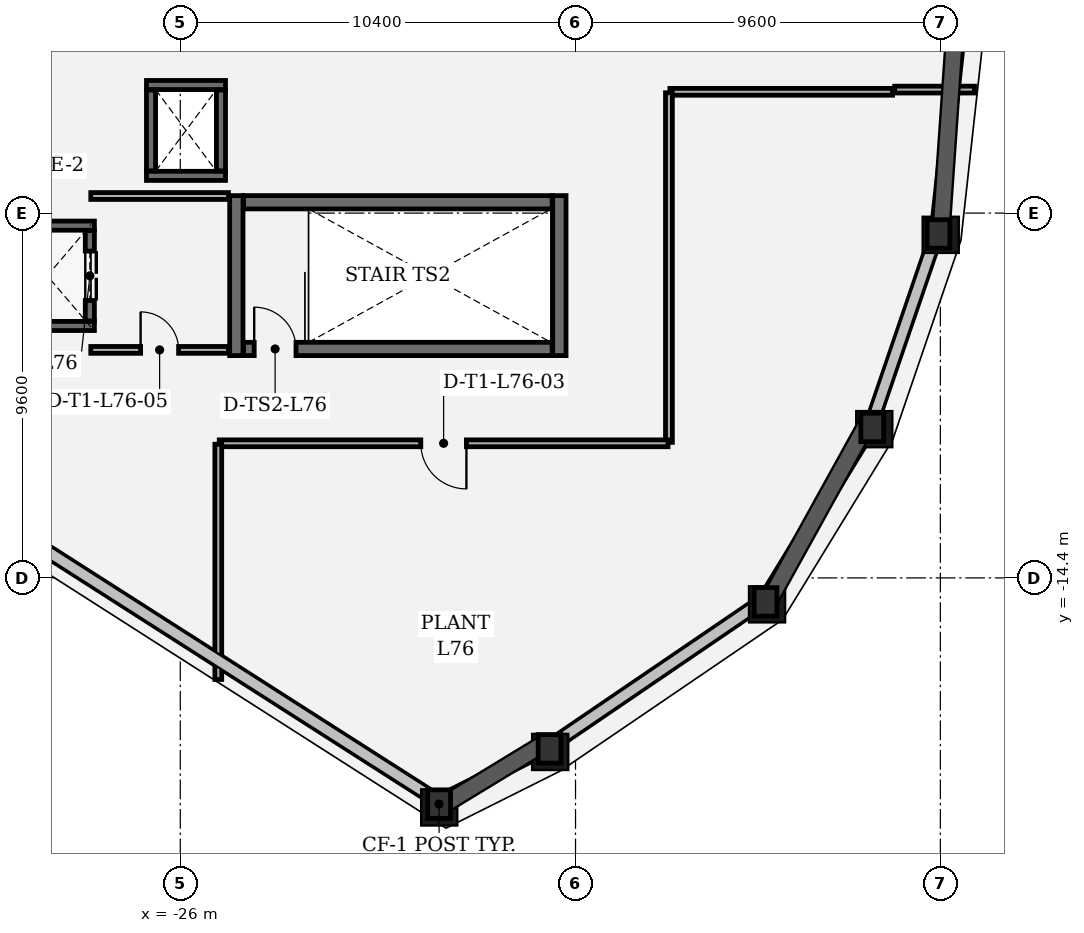
"""IFC4 building model, lengths in metres.
Left out: names, types, materials, properties, quantities, classifications, styles, units other than length and angle.
Written with IfcOpenShell. Run it as: python <this file> out.ifc"""

import sys

from ifc_helpers import new_model, si_unit, direction, frame, frame_2d, origin, place, context, subcontext, project, spatial, rectangle, extrude, element, fill, save


model = new_model("IFC4")
c1 = context("Model", 3, precision=1e-05, world=origin(), true_north=direction((0.0, 1.0)))
c2 = subcontext(c1, "Body", "Model", "MODEL_VIEW")
j1 = project(units=[si_unit("LENGTHUNIT", "METRE"), si_unit("PLANEANGLEUNIT", "RADIAN")], contexts=[c1])
p1 = place(None, origin())
s1 = spatial("IfcSite", under=j1, at=p1, CompositionType="ELEMENT")
p2 = place(p1, origin())
s2 = spatial("IfcBuilding", under=s1, at=p2, CompositionType="ELEMENT")
p3 = place(p2, frame((0.0, 0.0, 327.0)))
s3 = spatial("IfcBuildingStorey", under=s2, at=p3, CompositionType="ELEMENT", Elevation=327.0)
for number, where, z_axis, x_axis in (
    (1, (-24.525, -4.34, 0.0), (0.0, 0.0, 1.0), (0.0, -1.0, 0.0)),
    (2, (-16.025, -8.55, 0.0), (0.0, 0.0, 1.0), (0.0, 1.0, 0.0)),
):
    element("IfcWall", number, at=place(p3, frame(where, z_axis=z_axis, x_axis=x_axis)), inside=s3, PredefinedType="SHEAR", context=c2, shape_type="SweptSolid", body=[
        extrude(rectangle(XDim=4.21, YDim=0.35, at=frame_2d((2.105, 0.0))), origin(), (0.0, 0.0, 1.0), 3.92),
    ])
p4 = place(p3, frame((-24.335, -8.375, 0.0), z_axis=(0.0, 0.0, 1.0), x_axis=(1.0, 0.0, 0.0)))
e3 = element("IfcWall", 3, at=p4, inside=s3, PredefinedType="SHEAR", context=c2, shape_type="SweptSolid", body=[
    extrude(rectangle(XDim=8.12, YDim=0.35, at=frame_2d((4.06, 0.0))), origin(), (0.0, 0.0, 1.0), 3.92),
])
p5 = place(p4, frame((0.28, 0.0, 0.0)))
e4 = element("IfcOpeningElement", 4, at=p5, cuts=e3, PredefinedType="OPENING", context=c2, shape_type="SweptSolid", body=[
    extrude(rectangle(XDim=1.1, YDim=2.2, at=frame_2d((0.55, 1.1))), frame((0.0, 0.185, 0.0), z_axis=(0.0, -1.0, 0.0), x_axis=(1.0, 0.0, 0.0)), (0.0, 0.0, 1.0), 0.37),
])
p6 = place(p3, frame((-16.215, -4.515, 0.0), z_axis=(0.0, 0.0, 1.0), x_axis=(-1.0, 0.0, 0.0)))
e5 = element("IfcWall", 5, at=p6, inside=s3, PredefinedType="SHEAR", context=c2, shape_type="SweptSolid", body=[
    extrude(rectangle(XDim=8.12, YDim=0.35, at=frame_2d((4.06, 0.0))), origin(), (0.0, 0.0, 1.0), 3.92),
])
for number, where, z_axis, x_axis in (
    (6, (-28.26, -7.77, 0.0), (0.0, 0.0, 1.0), (-1.0, 0.0, 0.0)),
    (7, (-30.74, -5.13, 0.0), (0.0, 0.0, 1.0), (1.0, 0.0, 0.0)),
):
    element("IfcWall", number, at=place(p3, frame(where, z_axis=z_axis, x_axis=x_axis)), inside=s3, PredefinedType="SHEAR", context=c2, shape_type="SweptSolid", body=[
        extrude(rectangle(XDim=2.48, YDim=0.24, at=frame_2d((1.24, 0.0))), origin(), (0.0, 0.0, 1.0), 3.92),
    ])
p7 = place(p3, frame((-28.38, -5.262, 0.0), z_axis=(0.0, 0.0, 1.0), x_axis=(0.0, -1.0, 0.0)))
e8 = element("IfcWall", 8, at=p7, inside=s3, PredefinedType="SHEAR", context=c2, shape_type="SweptSolid", body=[
    extrude(rectangle(XDim=2.376, YDim=0.24, at=frame_2d((1.188, 0.0))), origin(), (0.0, 0.0, 1.0), 3.92),
])
p8 = place(p7, frame((0.538, 0.0, 0.0)))
e9 = element("IfcOpeningElement", 9, at=p8, cuts=e8, PredefinedType="OPENING", context=c2, shape_type="SweptSolid", body=[
    extrude(rectangle(XDim=1.3, YDim=2.3, at=frame_2d((0.65, 1.15))), frame((0.0, 0.13, 0.0), z_axis=(0.0, -1.0, 0.0), x_axis=(1.0, 0.0, 0.0)), (0.0, 0.0, 1.0), 0.26),
])
for number, where, z_axis, x_axis in (
    (10, (-24.81, -3.82, 0.0), (0.0, 0.0, 1.0), (-1.0, 0.0, 0.0)),
    (11, (-26.89, -1.43, 0.0), (0.0, 0.0, 1.0), (1.0, 0.0, 0.0)),
):
    element("IfcWall", number, at=place(p3, frame(where, z_axis=z_axis, x_axis=x_axis)), inside=s3, PredefinedType="SHEAR", context=c2, shape_type="SweptSolid", body=[
        extrude(rectangle(XDim=2.08, YDim=0.24, at=frame_2d((1.04, 0.0))), origin(), (0.0, 0.0, 1.0), 3.92),
    ])
for number, where, z_axis, x_axis in (
    (12, (-26.77, -3.688, 0.0), (0.0, 0.0, 1.0), (0.0, 1.0, 0.0)),
    (13, (-24.93, -1.562, 0.0), (0.0, 0.0, 1.0), (0.0, -1.0, 0.0)),
):
    element("IfcWall", number, at=place(p3, frame(where, z_axis=z_axis, x_axis=x_axis)), inside=s3, PredefinedType="SHEAR", context=c2, shape_type="SweptSolid", body=[
        extrude(rectangle(XDim=2.126, YDim=0.24, at=frame_2d((1.063, 0.0))), origin(), (0.0, 0.0, 1.0), 3.92),
    ])
p9 = place(p3, frame((-28.355, -8.4, 0.0), z_axis=(0.0, 0.0, 1.0), x_axis=(1.0, 0.0, 0.0)))
e14 = element("IfcWall", 14, at=p9, inside=s3, PredefinedType="PARTITIONING", context=c2, shape_type="SweptSolid", body=[
    extrude(rectangle(XDim=3.622, YDim=0.18, at=frame_2d((1.811, 0.0))), origin(), (0.0, 0.0, 1.0), 3.92),
])
p10 = place(p9, frame((1.311, 0.0, 0.0)))
e15 = element("IfcOpeningElement", 15, at=p10, cuts=e14, PredefinedType="OPENING", context=c2, shape_type="SweptSolid", body=[
    extrude(rectangle(XDim=1.0, YDim=2.15, at=frame_2d((0.5, 1.075))), frame((0.0, 0.1, 0.0), z_axis=(0.0, -1.0, 0.0), x_axis=(1.0, 0.0, 0.0)), (0.0, 0.0, 1.0), 0.2),
])
p11 = place(p3, frame((-24.733, -4.35, 0.0), z_axis=(0.0, 0.0, 1.0), x_axis=(-1.0, 0.0, 0.0)))
e16 = element("IfcWall", 16, at=p11, inside=s3, PredefinedType="PARTITIONING", context=c2, shape_type="SweptSolid", body=[
    extrude(rectangle(XDim=3.622, YDim=0.18, at=frame_2d((1.811, 0.0))), origin(), (0.0, 0.0, 1.0), 3.92),
])
p12 = place(p3, frame((-5.101, -1.55, 0.0), z_axis=(0.0, 0.0, 1.0), x_axis=(-1.0, 0.0, 0.0)))
e17 = element("IfcWall", 17, at=p12, inside=s3, PredefinedType="PARTITIONING", context=c2, shape_type="SweptSolid", body=[
    extrude(rectangle(XDim=2.1, YDim=0.18, at=frame_2d((1.05, 0.0))), origin(), (0.0, 0.0, 1.0), 3.92),
])
p13 = place(p3, frame((-7.258, -1.608, 0.0), z_axis=(0.0, 0.0, 1.0), x_axis=(-1.0, 0.0, 0.0)))
e18 = element("IfcWall", 18, at=p13, inside=s3, PredefinedType="PARTITIONING", context=c2, shape_type="SweptSolid", body=[
    extrude(rectangle(XDim=5.859, YDim=0.18, at=frame_2d((2.93, 0.0))), origin(), (0.0, 0.0, 1.0), 3.92),
])
p14 = place(p3, frame((-13.142, -10.833, 0.0), z_axis=(0.0, 0.0, 1.0), x_axis=(0.0, 1.0, 0.0)))
e19 = element("IfcWall", 19, at=p14, inside=s3, PredefinedType="PARTITIONING", context=c2, shape_type="SweptSolid", body=[
    extrude(rectangle(XDim=9.2, YDim=0.18, at=frame_2d((4.6, 0.0))), origin(), (0.0, 0.0, 1.0), 3.92),
])
p15 = place(p3, frame((-13.167, -10.858, 0.0), z_axis=(0.0, 0.0, 1.0), x_axis=(-1.0, 0.0, 0.0)))
e20 = element("IfcWall", 20, at=p15, inside=s3, PredefinedType="PARTITIONING", context=c2, shape_type="SweptSolid", body=[
    extrude(rectangle(XDim=11.808, YDim=0.18, at=frame_2d((5.904, 0.0))), origin(), (0.0, 0.0, 1.0), 3.92),
])
p16 = place(p15, frame((5.304, 0.0, 0.0)))
e21 = element("IfcOpeningElement", 21, at=p16, cuts=e20, PredefinedType="OPENING", context=c2, shape_type="SweptSolid", body=[
    extrude(rectangle(XDim=1.2, YDim=2.15, at=frame_2d((0.6, 1.075))), frame((0.0, 0.1, 0.0), z_axis=(0.0, -1.0, 0.0), x_axis=(1.0, 0.0, 0.0)), (0.0, 0.0, 1.0), 0.2),
])
p17 = place(p3, frame((-25.0, -10.883, 0.0), z_axis=(0.0, 0.0, 1.0), x_axis=(0.0, -1.0, 0.0)))
e22 = element("IfcWall", 22, at=p17, inside=s3, PredefinedType="PARTITIONING", context=c2, shape_type="SweptSolid", body=[
    extrude(rectangle(XDim=6.19, YDim=0.18, at=frame_2d((3.095, 0.0))), origin(), (0.0, 0.0, 1.0), 3.92),
])
p18 = place(p5, origin())
e23 = element("IfcDoor", 23, at=p18, inside=s3, OperationType="SINGLE_SWING_LEFT", PredefinedType="DOOR", context=c2, shape_type="SweptSolid", body=[
    extrude(rectangle(XDim=1.1, YDim=2.2, at=frame_2d((0.55, 1.1))), frame((0.0, 0.025, 0.0), z_axis=(0.0, -1.0, 0.0), x_axis=(1.0, 0.0, 0.0)), (0.0, 0.0, 1.0), 0.05),
])
fill(e4, e23)
p19 = place(p8, origin())
e24 = element("IfcDoor", 24, at=p19, inside=s3, OperationType="DOUBLE_DOOR_SLIDING", PredefinedType="DOOR", context=c2, shape_type="SweptSolid", body=[
    extrude(rectangle(XDim=1.3, YDim=2.3, at=frame_2d((0.65, 1.15))), frame((0.0, 0.025, 0.0), z_axis=(0.0, -1.0, 0.0), x_axis=(1.0, 0.0, 0.0)), (0.0, 0.0, 1.0), 0.05),
])
fill(e9, e24)
p20 = place(p16, origin())
e25 = element("IfcDoor", 25, at=p20, inside=s3, OperationType="SINGLE_SWING_LEFT", PredefinedType="DOOR", context=c2, shape_type="SweptSolid", body=[
    extrude(rectangle(XDim=1.2, YDim=2.15, at=frame_2d((0.6, 1.075))), frame((0.0, 0.025, 0.0), z_axis=(0.0, -1.0, 0.0), x_axis=(1.0, 0.0, 0.0)), (0.0, 0.0, 1.0), 0.05),
])
fill(e21, e25)
p21 = place(p10, origin())
e26 = element("IfcDoor", 26, at=p21, inside=s3, OperationType="SINGLE_SWING_LEFT", PredefinedType="DOOR", context=c2, shape_type="SweptSolid", body=[
    extrude(rectangle(XDim=1.0, YDim=2.15, at=frame_2d((0.5, 1.075))), frame((0.0, 0.025, 0.0), z_axis=(0.0, -1.0, 0.0), x_axis=(1.0, 0.0, 0.0)), (0.0, 0.0, 1.0), 0.05),
])
fill(e15, e26)
save(model, sys.argv[1])
